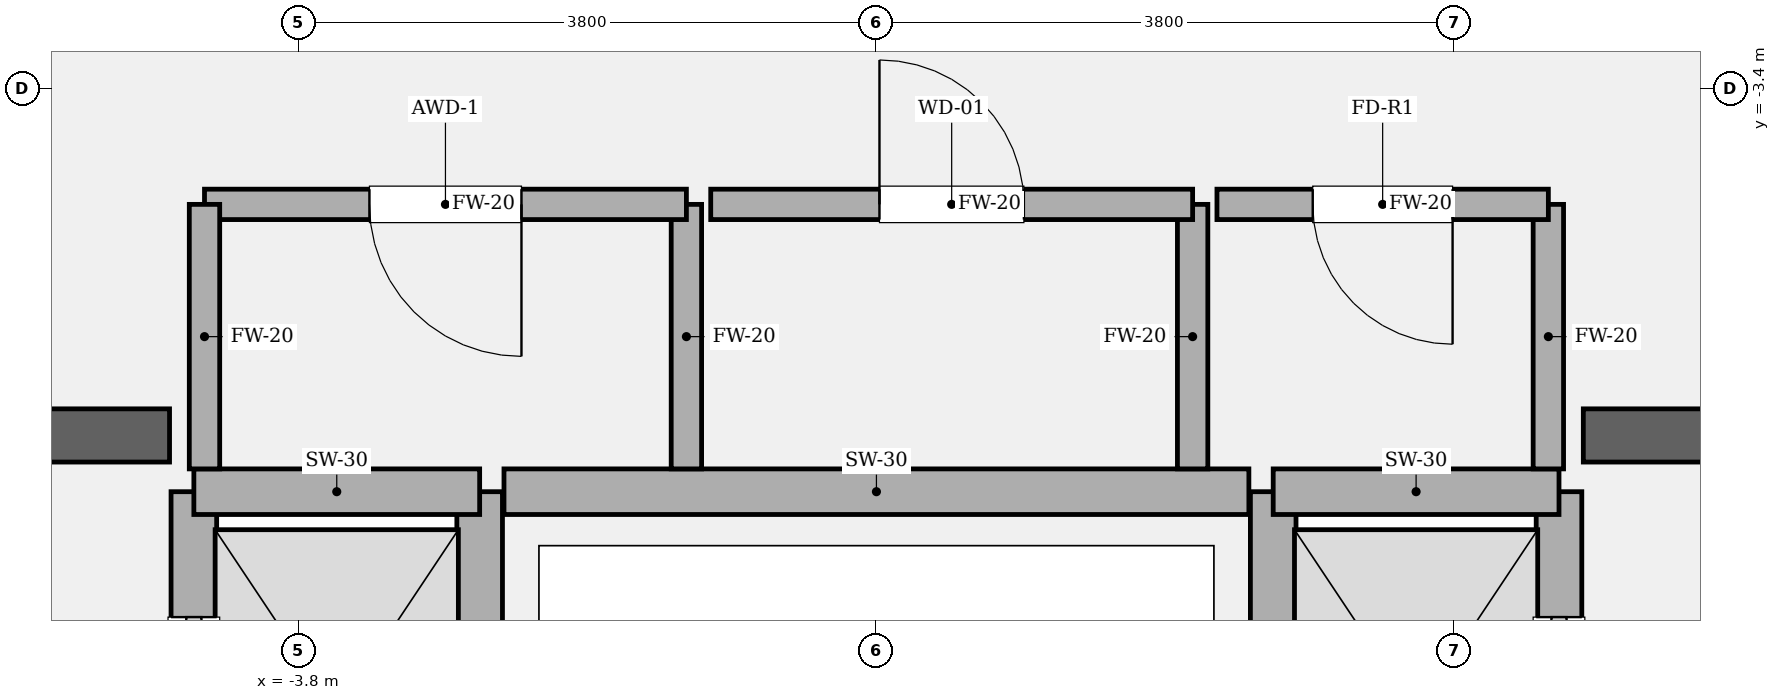
"""IFC4 building model, lengths in metres.
Left out: names, types, materials, properties, quantities, classifications, styles, units other than length and angle.
Written with IfcOpenShell. Run it as: python <this file> out.ifc"""

import sys

from ifc_helpers import new_model, si_unit, direction, frame, frame_2d, origin, place, context, subcontext, project, spatial, rectangle, extrude, element, fill, save


model = new_model("IFC4")
c1 = context("Model", 3, precision=1e-05, world=origin(), true_north=direction((0.0, 1.0)))
c2 = subcontext(c1, "Body", "Model", "MODEL_VIEW")
j1 = project(units=[si_unit("LENGTHUNIT", "METRE"), si_unit("PLANEANGLEUNIT", "RADIAN")], contexts=[c1])
p1 = place(None, origin())
s1 = spatial("IfcSite", under=j1, at=p1, CompositionType="ELEMENT")
p2 = place(p1, origin())
s2 = spatial("IfcBuilding", under=s1, at=p2, CompositionType="ELEMENT")
p3 = place(p2, frame((0.0, 0.0, 113.25)))
s3 = spatial("IfcBuildingStorey", under=s2, at=p3, CompositionType="ELEMENT", Elevation=113.25)
p4 = place(p3, frame((-9.825, -5.68, 0.0), z_axis=(0.0, 0.0, 1.0), x_axis=(1.0, 0.0, 0.0)))
e1 = element("IfcWall", 1, at=p4, inside=s3, PredefinedType="SOLIDWALL", context=c2, shape_type="SweptSolid", body=[
    extrude(rectangle(XDim=5.175, YDim=0.35, at=frame_2d((2.587, 0.0))), origin(), (0.0, 0.0, 1.0), 4.05),
])
p5 = place(p4, frame((1.285, 0.0, 0.0)))
e2 = element("IfcOpeningElement", 2, at=p5, cuts=e1, PredefinedType="OPENING", context=c2, shape_type="SweptSolid", body=[
    extrude(rectangle(XDim=1.18, YDim=2.2, at=frame_2d((0.59, 1.1))), frame((0.0, 0.185, 0.0), z_axis=(0.0, -1.0, 0.0), x_axis=(1.0, 0.0, 0.0)), (0.0, 0.0, 1.0), 0.37),
])
p6 = place(p3, frame((4.65, -5.68, 0.0), z_axis=(0.0, 0.0, 1.0), x_axis=(1.0, 0.0, 0.0)))
e3 = element("IfcWall", 3, at=p6, inside=s3, PredefinedType="SOLIDWALL", context=c2, shape_type="SweptSolid", body=[
    extrude(rectangle(XDim=5.175, YDim=0.35, at=frame_2d((2.587, 0.0))), origin(), (0.0, 0.0, 1.0), 4.05),
])
p7 = place(p6, frame((2.71, 0.0, 0.0)))
e4 = element("IfcOpeningElement", 4, at=p7, cuts=e3, PredefinedType="OPENING", context=c2, shape_type="SweptSolid", body=[
    extrude(rectangle(XDim=1.18, YDim=2.2, at=frame_2d((0.59, 1.1))), frame((0.0, 0.185, 0.0), z_axis=(0.0, -1.0, 0.0), x_axis=(1.0, 0.0, 0.0)), (0.0, 0.0, 1.0), 0.37),
])
p8 = place(p3, frame((-4.49, -8.82, 0.0), z_axis=(0.0, 0.0, 1.0), x_axis=(0.0, 1.0, 0.0)))
e5 = element("IfcWall", 5, at=p8, inside=s3, PredefinedType="SOLIDWALL", context=c2, shape_type="SweptSolid", body=[
    extrude(rectangle(XDim=2.77, YDim=0.3, at=frame_2d((1.385, 0.0))), origin(), (0.0, 0.0, 1.0), 3.81),
])
p9 = place(p8, frame((0.825, 0.0, 0.0)))
e6 = element("IfcOpeningElement", 6, at=p9, cuts=e5, PredefinedType="OPENING", context=c2, shape_type="SweptSolid", body=[
    extrude(rectangle(XDim=1.12, YDim=2.25, at=frame_2d((0.56, 1.125))), frame((0.0, 0.16, 0.0), z_axis=(0.0, -1.0, 0.0), x_axis=(1.0, 0.0, 0.0)), (0.0, 0.0, 1.0), 0.32),
])
p10 = place(p3, frame((-2.61, -8.82, 0.0), z_axis=(0.0, 0.0, 1.0), x_axis=(0.0, 1.0, 0.0)))
e7 = element("IfcWall", 7, at=p10, inside=s3, PredefinedType="SOLIDWALL", context=c2, shape_type="SweptSolid", body=[
    extrude(rectangle(XDim=2.77, YDim=0.3, at=frame_2d((1.385, 0.0))), origin(), (0.0, 0.0, 1.0), 3.81),
])
p11 = place(p3, frame((-4.49, -6.05, 0.0), z_axis=(0.0, 0.0, 1.0), x_axis=(1.0, 0.0, 0.0)))
e8 = element("IfcWall", 8, at=p11, inside=s3, PredefinedType="SOLIDWALL", context=c2, shape_type="SweptSolid", body=[
    extrude(rectangle(XDim=1.88, YDim=0.3, at=frame_2d((0.94, 0.0))), origin(), (0.0, 0.0, 1.0), 3.81),
])
p12 = place(p3, frame((4.49, -8.82, 0.0), z_axis=(0.0, 0.0, 1.0), x_axis=(0.0, 1.0, 0.0)))
e9 = element("IfcWall", 9, at=p12, inside=s3, PredefinedType="SOLIDWALL", context=c2, shape_type="SweptSolid", body=[
    extrude(rectangle(XDim=2.77, YDim=0.3, at=frame_2d((1.385, 0.0))), origin(), (0.0, 0.0, 1.0), 3.81),
])
p13 = place(p12, frame((0.825, 0.0, 0.0)))
e10 = element("IfcOpeningElement", 10, at=p13, cuts=e9, PredefinedType="OPENING", context=c2, shape_type="SweptSolid", body=[
    extrude(rectangle(XDim=1.12, YDim=2.25, at=frame_2d((0.56, 1.125))), frame((0.0, 0.16, 0.0), z_axis=(0.0, -1.0, 0.0), x_axis=(1.0, 0.0, 0.0)), (0.0, 0.0, 1.0), 0.32),
])
p14 = place(p3, frame((2.61, -8.82, 0.0), z_axis=(0.0, 0.0, 1.0), x_axis=(0.0, 1.0, 0.0)))
e11 = element("IfcWall", 11, at=p14, inside=s3, PredefinedType="SOLIDWALL", context=c2, shape_type="SweptSolid", body=[
    extrude(rectangle(XDim=2.77, YDim=0.3, at=frame_2d((1.385, 0.0))), origin(), (0.0, 0.0, 1.0), 3.81),
])
p15 = place(p3, frame((2.61, -6.05, 0.0), z_axis=(0.0, 0.0, 1.0), x_axis=(1.0, 0.0, 0.0)))
e12 = element("IfcWall", 12, at=p15, inside=s3, PredefinedType="SOLIDWALL", context=c2, shape_type="SweptSolid", body=[
    extrude(rectangle(XDim=1.88, YDim=0.3, at=frame_2d((0.94, 0.0))), origin(), (0.0, 0.0, 1.0), 3.81),
])
p16 = place(p3, frame((-2.45, -6.05, 0.0), z_axis=(0.0, 0.0, 1.0), x_axis=(1.0, 0.0, 0.0)))
e13 = element("IfcWall", 13, at=p16, inside=s3, PredefinedType="SOLIDWALL", context=c2, shape_type="SweptSolid", body=[
    extrude(rectangle(XDim=4.9, YDim=0.3, at=frame_2d((2.45, 0.0))), origin(), (0.0, 0.0, 1.0), 3.81),
])
p17 = place(p3, frame((-1.25, -5.9, 0.0), z_axis=(0.0, 0.0, 1.0), x_axis=(0.0, 1.0, 0.0)))
e14 = element("IfcWall", 14, at=p17, inside=s3, PredefinedType="SOLIDWALL", context=c2, shape_type="SweptSolid", body=[
    extrude(rectangle(XDim=1.74, YDim=0.2, at=frame_2d((0.87, 0.0))), origin(), (0.0, 0.0, 1.0), 3.81),
])
p18 = place(p3, frame((-1.25, -4.16, 0.0), z_axis=(0.0, 0.0, 1.0), x_axis=(-1.0, 0.0, 0.0)))
e15 = element("IfcWall", 15, at=p18, inside=s3, PredefinedType="SOLIDWALL", context=c2, shape_type="SweptSolid", body=[
    extrude(rectangle(XDim=3.17, YDim=0.2, at=frame_2d((1.585, 0.0))), origin(), (0.0, 0.0, 1.0), 3.81),
])
p19 = place(p18, frame((1.085, 0.0, 0.0)))
e16 = element("IfcOpeningElement", 16, at=p19, cuts=e15, PredefinedType="OPENING", context=c2, shape_type="SweptSolid", body=[
    extrude(rectangle(XDim=1.0, YDim=2.15, at=frame_2d((0.5, 1.075))), frame((0.0, 0.11, 0.0), z_axis=(0.0, -1.0, 0.0), x_axis=(1.0, 0.0, 0.0)), (0.0, 0.0, 1.0), 0.22),
])
for number, where, z_axis, x_axis in (
    (17, (-4.42, -4.16, 0.0), (0.0, 0.0, 1.0), (0.0, -1.0, 0.0)),
    (18, (2.08, -5.9, 0.0), (0.0, 0.0, 1.0), (0.0, 1.0, 0.0)),
):
    element("IfcWall", number, at=place(p3, frame(where, z_axis=z_axis, x_axis=x_axis)), inside=s3, PredefinedType="SOLIDWALL", context=c2, shape_type="SweptSolid", body=[
        extrude(rectangle(XDim=1.74, YDim=0.2, at=frame_2d((0.87, 0.0))), origin(), (0.0, 0.0, 1.0), 3.81),
    ])
p20 = place(p3, frame((2.08, -4.16, 0.0), z_axis=(0.0, 0.0, 1.0), x_axis=(-1.0, 0.0, 0.0)))
e19 = element("IfcWall", 19, at=p20, inside=s3, PredefinedType="SOLIDWALL", context=c2, shape_type="SweptSolid", body=[
    extrude(rectangle(XDim=3.17, YDim=0.2, at=frame_2d((1.585, 0.0))), origin(), (0.0, 0.0, 1.0), 3.81),
])
p21 = place(p20, frame((1.11, 0.0, 0.0)))
e20 = element("IfcOpeningElement", 20, at=p21, cuts=e19, PredefinedType="OPENING", context=c2, shape_type="SweptSolid", body=[
    extrude(rectangle(XDim=0.95, YDim=2.15, at=frame_2d((0.475, 1.075))), frame((0.0, 0.11, 0.0), z_axis=(0.0, -1.0, 0.0), x_axis=(1.0, 0.0, 0.0)), (0.0, 0.0, 1.0), 0.22),
])
p22 = place(p3, frame((4.42, -5.9, 0.0), z_axis=(0.0, 0.0, 1.0), x_axis=(0.0, 1.0, 0.0)))
e21 = element("IfcWall", 21, at=p22, inside=s3, PredefinedType="SOLIDWALL", context=c2, shape_type="SweptSolid", body=[
    extrude(rectangle(XDim=1.74, YDim=0.2, at=frame_2d((0.87, 0.0))), origin(), (0.0, 0.0, 1.0), 3.81),
])
p23 = place(p3, frame((4.42, -4.16, 0.0), z_axis=(0.0, 0.0, 1.0), x_axis=(-1.0, 0.0, 0.0)))
e22 = element("IfcWall", 22, at=p23, inside=s3, PredefinedType="SOLIDWALL", context=c2, shape_type="SweptSolid", body=[
    extrude(rectangle(XDim=2.18, YDim=0.2, at=frame_2d((1.09, 0.0))), origin(), (0.0, 0.0, 1.0), 3.81),
])
p24 = place(p23, frame((0.63, 0.0, 0.0)))
e23 = element("IfcOpeningElement", 23, at=p24, cuts=e22, PredefinedType="OPENING", context=c2, shape_type="SweptSolid", body=[
    extrude(rectangle(XDim=0.92, YDim=2.1, at=frame_2d((0.46, 1.05))), frame((0.0, 0.11, 0.0), z_axis=(0.0, -1.0, 0.0), x_axis=(1.0, 0.0, 0.0)), (0.0, 0.0, 1.0), 0.22),
])
p25 = place(p9, origin())
e24 = element("IfcDoor", 24, at=p25, inside=s3, OperationType="SLIDING_TO_LEFT", PredefinedType="DOOR", context=c2, shape_type="SweptSolid", body=[
    extrude(rectangle(XDim=1.12, YDim=2.25, at=frame_2d((0.56, 1.125))), frame((0.0, 0.025, 0.0), z_axis=(0.0, -1.0, 0.0), x_axis=(1.0, 0.0, 0.0)), (0.0, 0.0, 1.0), 0.05),
])
fill(e6, e24)
p26 = place(p13, origin())
e25 = element("IfcDoor", 25, at=p26, inside=s3, OperationType="SLIDING_TO_RIGHT", PredefinedType="DOOR", context=c2, shape_type="SweptSolid", body=[
    extrude(rectangle(XDim=1.12, YDim=2.25, at=frame_2d((0.56, 1.125))), frame((0.0, 0.025, 0.0), z_axis=(0.0, -1.0, 0.0), x_axis=(1.0, 0.0, 0.0)), (0.0, 0.0, 1.0), 0.05),
])
fill(e10, e25)
p27 = place(p19, origin())
e26 = element("IfcDoor", 26, at=p27, inside=s3, OperationType="SINGLE_SWING_LEFT", PredefinedType="DOOR", context=c2, shape_type="SweptSolid", body=[
    extrude(rectangle(XDim=1.0, YDim=2.15, at=frame_2d((0.5, 1.075))), frame((0.0, 0.025, 0.0), z_axis=(0.0, -1.0, 0.0), x_axis=(1.0, 0.0, 0.0)), (0.0, 0.0, 1.0), 0.05),
])
fill(e16, e26)
p28 = place(p21, origin())
e27 = element("IfcDoor", 27, at=p28, inside=s3, OperationType="SINGLE_SWING_RIGHT", PredefinedType="DOOR", context=c2, shape_type="SweptSolid", body=[
    extrude(rectangle(XDim=0.95, YDim=2.15, at=frame_2d((0.475, 1.075))), frame((0.0, 0.025, 0.0), z_axis=(0.0, -1.0, 0.0), x_axis=(1.0, 0.0, 0.0)), (0.0, 0.0, 1.0), 0.05),
])
fill(e20, e27)
p29 = place(p24, origin())
e28 = element("IfcDoor", 28, at=p29, inside=s3, OperationType="SINGLE_SWING_LEFT", PredefinedType="DOOR", context=c2, shape_type="SweptSolid", body=[
    extrude(rectangle(XDim=0.92, YDim=2.1, at=frame_2d((0.46, 1.05))), frame((0.0, 0.025, 0.0), z_axis=(0.0, -1.0, 0.0), x_axis=(1.0, 0.0, 0.0)), (0.0, 0.0, 1.0), 0.05),
])
fill(e23, e28)
save(model, sys.argv[1])
